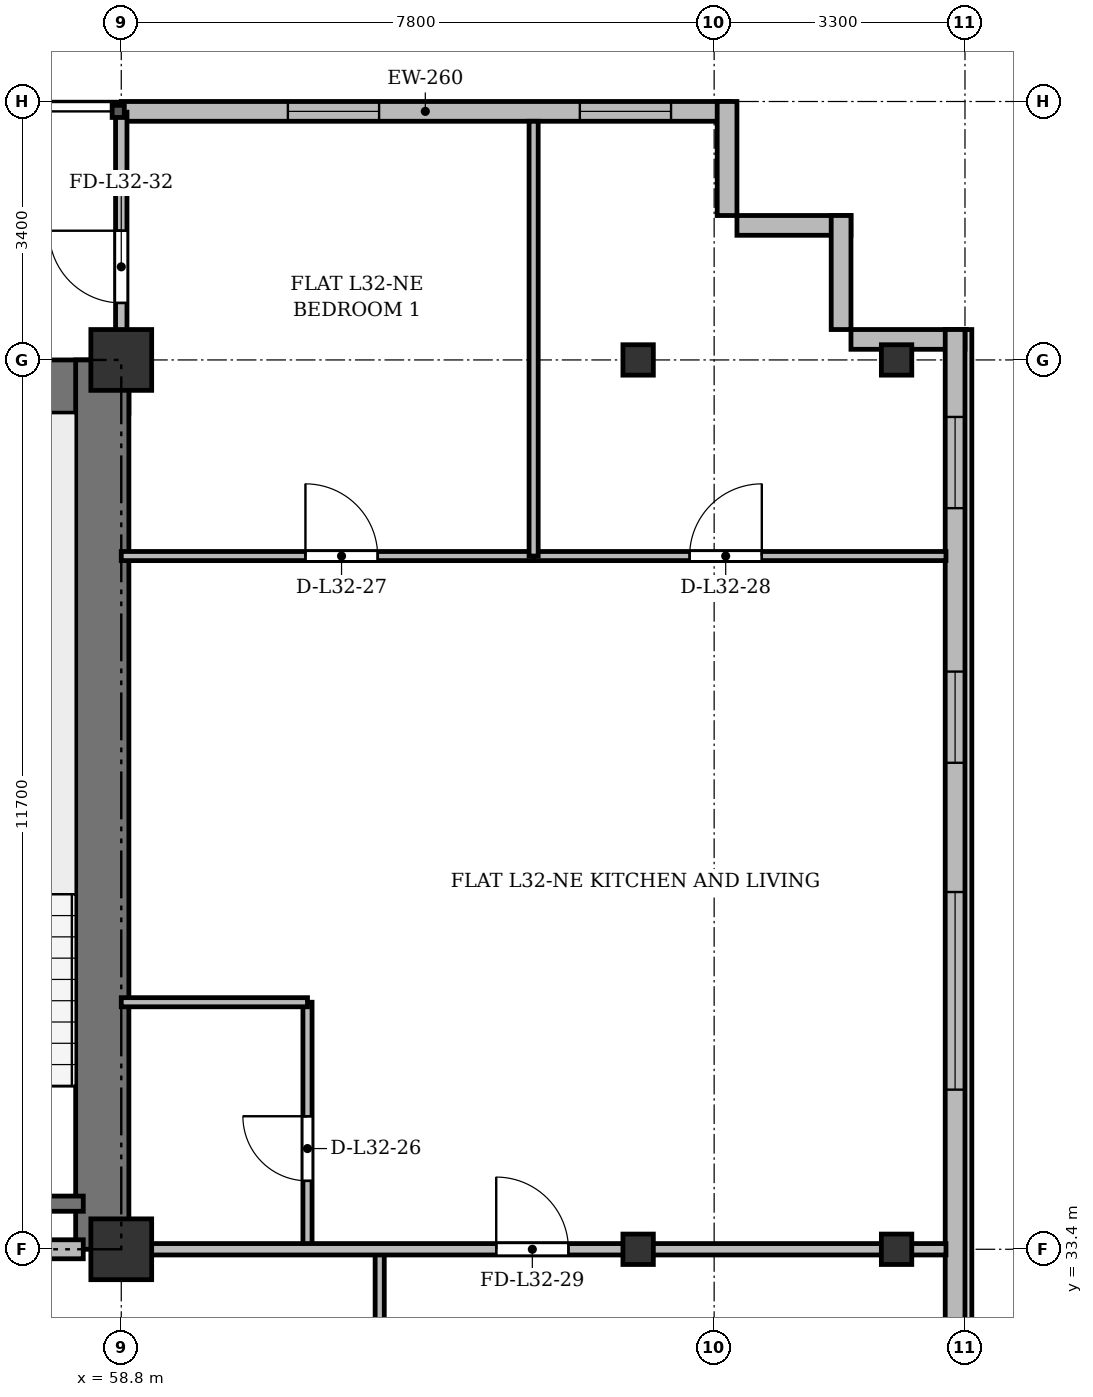
"""IFC4 building model, lengths in metres.
Left out: names, types, materials, properties, quantities, classifications, styles, units other than length and angle.
Written with IfcOpenShell. Run it as: python <this file> out.ifc"""

import sys

from ifc_helpers import new_model, si_unit, direction, frame, frame_2d, origin, origin_2d, place, context, subcontext, project, spatial, rectangle, i_section, extrude, source, transform, mapped, element, fill, save


model = new_model("IFC4")
c1 = context("Model", 3, precision=1e-05, world=origin(), true_north=direction((0.0, 1.0)))
c2 = subcontext(c1, "Body", "Model", "MODEL_VIEW")
j1 = project(units=[si_unit("LENGTHUNIT", "METRE"), si_unit("PLANEANGLEUNIT", "RADIAN")], contexts=[c1])
p1 = place(None, origin())
s1 = spatial("IfcSite", under=j1, at=p1, CompositionType="ELEMENT")
p2 = place(p1, origin())
s2 = spatial("IfcBuilding", under=s1, at=p2, CompositionType="ELEMENT")
p3 = place(p2, frame((0.0, 0.0, 124.9)))
s3 = spatial("IfcBuildingStorey", under=s2, at=p3, CompositionType="ELEMENT", Elevation=124.9)
m1 = source(origin(), c2, "Body", "SweptSolid", [
    extrude(rectangle(XDim=0.8, YDim=0.8, at=origin_2d()), origin(), (0.0, 0.0, 1.0), 3.6),
])
for number, where, z_axis, x_axis in (
    (1, (58.8, 33.4, 0.0), (0.0, 0.0, 1.0), (1.0, 0.0, 0.0)),
    (2, (58.8, 45.1, 0.0), (0.0, 0.0, 1.0), (1.0, 0.0, 0.0)),
):
    element("IfcColumn", number, at=place(p3, frame(where, z_axis=z_axis, x_axis=x_axis)), inside=s3, PredefinedType="COLUMN", context=c2, shape_type="MappedRepresentation", body=[
        mapped(m1, transform((0.0, 0.0, 0.0), x_axis=(1.0, 0.0, 0.0), y_axis=(0.0, 1.0, 0.0), z_axis=(0.0, 0.0, 1.0), scale=1.0)),
    ])
m2 = source(origin(), c2, "Body", "SweptSolid", [
    extrude(i_section(OverallWidth=0.4, OverallDepth=0.4, WebThickness=0.022, FlangeThickness=0.035, at=origin_2d()), origin(), (0.0, 0.0, 1.0), 3.6),
])
for number, where, z_axis, x_axis in (
    (3, (65.6, 33.4, 0.0), (0.0, 0.0, 1.0), (1.0, 0.0, 0.0)),
    (4, (65.6, 45.1, 0.0), (0.0, 0.0, 1.0), (1.0, 0.0, 0.0)),
    (5, (69.0, 33.4, 0.0), (0.0, 0.0, 1.0), (1.0, 0.0, 0.0)),
    (6, (69.0, 45.1, 0.0), (0.0, 0.0, 1.0), (1.0, 0.0, 0.0)),
):
    element("IfcColumn", number, at=place(p3, frame(where, z_axis=z_axis, x_axis=x_axis)), inside=s3, PredefinedType="COLUMN", context=c2, shape_type="MappedRepresentation", body=[
        mapped(m2, transform((0.0, 0.0, 0.0), x_axis=(1.0, 0.0, 0.0), y_axis=(0.0, 1.0, 0.0), z_axis=(0.0, 0.0, 1.0), scale=1.0)),
    ])
p4 = place(p3, frame((58.8, 48.37, 0.0), z_axis=(0.0, 0.0, 1.0), x_axis=(1.0, 0.0, 0.0)))
e7 = element("IfcWall", 7, at=p4, inside=s3, PredefinedType="SOLIDWALL", context=c2, shape_type="SweptSolid", body=[
    extrude(rectangle(XDim=8.0, YDim=0.26, at=frame_2d((4.0, 0.0))), origin(), (0.0, 0.0, 1.0), 3.34),
])
p5 = place(p4, frame((2.192, 0.0, 0.9)))
e8 = element("IfcOpeningElement", 8, at=p5, cuts=e7, PredefinedType="OPENING", context=c2, shape_type="SweptSolid", body=[
    extrude(rectangle(XDim=1.2, YDim=1.65, at=frame_2d((0.6, 0.825))), frame((0.0, 0.14, 0.0), z_axis=(0.0, -1.0, 0.0), x_axis=(1.0, 0.0, 0.0)), (0.0, 0.0, 1.0), 0.28),
])
p6 = place(p4, frame((6.033, 0.0, 0.9)))
e9 = element("IfcOpeningElement", 9, at=p6, cuts=e7, PredefinedType="OPENING", context=c2, shape_type="SweptSolid", body=[
    extrude(rectangle(XDim=1.2, YDim=1.65, at=frame_2d((0.6, 0.825))), frame((0.0, 0.14, 0.0), z_axis=(0.0, -1.0, 0.0), x_axis=(1.0, 0.0, 0.0)), (0.0, 0.0, 1.0), 0.28),
])
for number, where, z_axis, x_axis in (
    (10, (66.77, 48.5, 0.0), (0.0, 0.0, 1.0), (0.0, -1.0, 0.0)),
    (11, (66.9, 46.87, 0.0), (0.0, 0.0, 1.0), (1.0, 0.0, 0.0)),
    (12, (68.27, 47.0, 0.0), (0.0, 0.0, 1.0), (0.0, -1.0, 0.0)),
):
    element("IfcWall", number, at=place(p3, frame(where, z_axis=z_axis, x_axis=x_axis)), inside=s3, PredefinedType="SOLIDWALL", context=c2, shape_type="SweptSolid", body=[
        extrude(rectangle(XDim=1.5, YDim=0.26, at=frame_2d((0.75, 0.0))), origin(), (0.0, 0.0, 1.0), 3.34),
    ])
p7 = place(p3, frame((68.4, 45.37, 0.0), z_axis=(0.0, 0.0, 1.0), x_axis=(1.0, 0.0, 0.0)))
e13 = element("IfcWall", 13, at=p7, inside=s3, PredefinedType="SOLIDWALL", context=c2, shape_type="SweptSolid", body=[
    extrude(rectangle(XDim=1.5, YDim=0.26, at=frame_2d((0.75, 0.0))), origin(), (0.0, 0.0, 1.0), 2.752),
])
p8 = place(p3, frame((69.77, 45.5, 0.0), z_axis=(0.0, 0.0, 1.0), x_axis=(0.0, -1.0, 0.0)))
e14 = element("IfcWall", 14, at=p8, inside=s3, PredefinedType="SOLIDWALL", context=c2, shape_type="SweptSolid", body=[
    extrude(rectangle(XDim=39.6, YDim=0.26, at=frame_2d((19.8, 0.0))), origin(), (0.0, 0.0, 1.0), 3.34),
])
p9 = place(p8, frame((36.95, 0.0, 0.92)))
e15 = element("IfcOpeningElement", 15, at=p9, cuts=e14, PredefinedType="OPENING", context=c2, shape_type="SweptSolid", body=[
    extrude(rectangle(XDim=1.2, YDim=1.65, at=frame_2d((0.6, 0.825))), frame((0.0, 0.14, 0.0), z_axis=(0.0, -1.0, 0.0), x_axis=(1.0, 0.0, 0.0)), (0.0, 0.0, 1.0), 0.28),
])
p10 = place(p8, frame((32.8, 0.0, 0.92)))
e16 = element("IfcOpeningElement", 16, at=p10, cuts=e14, PredefinedType="OPENING", context=c2, shape_type="SweptSolid", body=[
    extrude(rectangle(XDim=2.6, YDim=1.9, at=frame_2d((1.3, 0.95))), frame((0.0, 0.14, 0.0), z_axis=(0.0, -1.0, 0.0), x_axis=(1.0, 0.0, 0.0)), (0.0, 0.0, 1.0), 0.28),
])
p11 = place(p8, frame((28.6, 0.0, 0.92)))
e17 = element("IfcOpeningElement", 17, at=p11, cuts=e14, PredefinedType="OPENING", context=c2, shape_type="SweptSolid", body=[
    extrude(rectangle(XDim=2.6, YDim=1.9, at=frame_2d((1.3, 0.95))), frame((0.0, 0.14, 0.0), z_axis=(0.0, -1.0, 0.0), x_axis=(1.0, 0.0, 0.0)), (0.0, 0.0, 1.0), 0.28),
])
p12 = place(p8, frame((21.4, 0.0, 0.92)))
e18 = element("IfcOpeningElement", 18, at=p12, cuts=e14, PredefinedType="OPENING", context=c2, shape_type="SweptSolid", body=[
    extrude(rectangle(XDim=2.6, YDim=1.9, at=frame_2d((1.3, 0.95))), frame((0.0, 0.14, 0.0), z_axis=(0.0, -1.0, 0.0), x_axis=(1.0, 0.0, 0.0)), (0.0, 0.0, 1.0), 0.28),
])
p13 = place(p8, frame((7.4, 0.0, 0.92)))
e19 = element("IfcOpeningElement", 19, at=p13, cuts=e14, PredefinedType="OPENING", context=c2, shape_type="SweptSolid", body=[
    extrude(rectangle(XDim=2.6, YDim=1.9, at=frame_2d((1.3, 0.95))), frame((0.0, 0.14, 0.0), z_axis=(0.0, -1.0, 0.0), x_axis=(1.0, 0.0, 0.0)), (0.0, 0.0, 1.0), 0.28),
])
p14 = place(p8, frame((4.5, 0.0, 0.92)))
e20 = element("IfcOpeningElement", 20, at=p14, cuts=e14, PredefinedType="OPENING", context=c2, shape_type="SweptSolid", body=[
    extrude(rectangle(XDim=1.2, YDim=1.65, at=frame_2d((0.6, 0.825))), frame((0.0, 0.14, 0.0), z_axis=(0.0, -1.0, 0.0), x_axis=(1.0, 0.0, 0.0)), (0.0, 0.0, 1.0), 0.28),
])
p15 = place(p8, frame((1.15, 0.0, 0.92)))
e21 = element("IfcOpeningElement", 21, at=p15, cuts=e14, PredefinedType="OPENING", context=c2, shape_type="SweptSolid", body=[
    extrude(rectangle(XDim=1.2, YDim=1.65, at=frame_2d((0.6, 0.825))), frame((0.0, 0.14, 0.0), z_axis=(0.0, -1.0, 0.0), x_axis=(1.0, 0.0, 0.0)), (0.0, 0.0, 1.0), 0.28),
])
p16 = place(p3, frame((15.5, 44.75, 0.0), z_axis=(0.0, 0.0, 1.0), x_axis=(1.0, 0.0, 0.0)))
e22 = element("IfcWall", 22, at=p16, inside=s3, PredefinedType="SHEAR", context=c2, shape_type="SweptSolid", body=[
    extrude(rectangle(XDim=43.4, YDim=0.7, at=frame_2d((21.7, 0.0))), origin(), (0.0, 0.0, 1.0), 3.34),
])
p17 = place(p3, frame((58.55, 33.4, 0.0), z_axis=(0.0, 0.0, 1.0), x_axis=(0.0, 1.0, 0.0)))
e23 = element("IfcWall", 23, at=p17, inside=s3, PredefinedType="SHEAR", context=c2, shape_type="SweptSolid", body=[
    extrude(rectangle(XDim=11.7, YDim=0.7, at=frame_2d((5.85, 0.0))), origin(), (0.0, 0.0, 1.0), 3.34),
])
p18 = place(p3, frame((54.9, 34.0, 0.0), z_axis=(0.0, 0.0, 1.0), x_axis=(1.0, 0.0, 0.0)))
e24 = element("IfcWall", 24, at=p18, inside=s3, PredefinedType="SHEAR", context=c2, shape_type="SweptSolid", body=[
    extrude(rectangle(XDim=3.4, YDim=0.2, at=frame_2d((1.7, 0.0))), origin(), (0.0, 0.0, 1.0), 3.34),
])
p19 = place(p3, frame((47.15, 33.4, 0.0), z_axis=(0.0, 0.0, 1.0), x_axis=(1.0, 0.0, 0.0)))
e25 = element("IfcWall", 25, at=p19, inside=s3, PredefinedType="PARTITIONING", context=c2, shape_type="SweptSolid", body=[
    extrude(rectangle(XDim=11.15, YDim=0.25, at=frame_2d((5.575, 0.0))), origin(), (0.0, 0.0, 1.0), 2.752),
])
p20 = place(p19, frame((0.7, 0.0, 0.0)))
e26 = element("IfcOpeningElement", 26, at=p20, cuts=e25, PredefinedType="OPENING", context=c2, shape_type="SweptSolid", body=[
    extrude(rectangle(XDim=0.95, YDim=2.15, at=frame_2d((0.475, 1.075))), frame((0.0, 0.135, 0.0), z_axis=(0.0, -1.0, 0.0), x_axis=(1.0, 0.0, 0.0)), (0.0, 0.0, 1.0), 0.27),
])
p21 = place(p19, frame((6.0, 0.0, 0.0)))
e27 = element("IfcOpeningElement", 27, at=p21, cuts=e25, PredefinedType="OPENING", context=c2, shape_type="SweptSolid", body=[
    extrude(rectangle(XDim=1.2, YDim=2.15, at=frame_2d((0.6, 1.075))), frame((0.0, 0.135, 0.0), z_axis=(0.0, -1.0, 0.0), x_axis=(1.0, 0.0, 0.0)), (0.0, 0.0, 1.0), 0.27),
])
p22 = place(p3, frame((62.2, 29.8, 0.0), z_axis=(0.0, 0.0, 1.0), x_axis=(0.0, 1.0, 0.0)))
e28 = element("IfcWall", 28, at=p22, inside=s3, PredefinedType="PARTITIONING", context=c2, shape_type="SweptSolid", body=[
    extrude(rectangle(XDim=3.6, YDim=0.12, at=frame_2d((1.8, 0.0))), origin(), (0.0, 0.0, 1.0), 2.752),
])
p23 = place(p3, frame((61.25, 33.4, 0.0), z_axis=(0.0, 0.0, 1.0), x_axis=(0.0, 1.0, 0.0)))
e29 = element("IfcWall", 29, at=p23, inside=s3, PredefinedType="PARTITIONING", context=c2, shape_type="SweptSolid", body=[
    extrude(rectangle(XDim=3.25, YDim=0.12, at=frame_2d((1.625, 0.0))), origin(), (0.0, 0.0, 1.0), 2.752),
])
p24 = place(p23, frame((0.9, 0.0, 0.0)))
e30 = element("IfcOpeningElement", 30, at=p24, cuts=e29, PredefinedType="OPENING", context=c2, shape_type="SweptSolid", body=[
    extrude(rectangle(XDim=0.85, YDim=2.1, at=frame_2d((0.425, 1.05))), frame((0.0, 0.07, 0.0), z_axis=(0.0, -1.0, 0.0), x_axis=(1.0, 0.0, 0.0)), (0.0, 0.0, 1.0), 0.14),
])
p25 = place(p3, frame((58.8, 36.65, 0.0), z_axis=(0.0, 0.0, 1.0), x_axis=(1.0, 0.0, 0.0)))
e31 = element("IfcWall", 31, at=p25, inside=s3, PredefinedType="PARTITIONING", context=c2, shape_type="SweptSolid", body=[
    extrude(rectangle(XDim=2.45, YDim=0.12, at=frame_2d((1.225, 0.0))), origin(), (0.0, 0.0, 1.0), 2.84),
])
p26 = place(p3, frame((58.8, 42.52, 0.0), z_axis=(0.0, 0.0, 1.0), x_axis=(1.0, 0.0, 0.0)))
e32 = element("IfcWall", 32, at=p26, inside=s3, PredefinedType="PARTITIONING", context=c2, shape_type="SweptSolid", body=[
    extrude(rectangle(XDim=5.425, YDim=0.12, at=frame_2d((2.712, 0.0))), origin(), (0.0, 0.0, 1.0), 2.84),
])
p27 = place(p26, frame((2.423, 0.0, 0.0)))
e33 = element("IfcOpeningElement", 33, at=p27, cuts=e32, PredefinedType="OPENING", context=c2, shape_type="SweptSolid", body=[
    extrude(rectangle(XDim=0.95, YDim=2.15, at=frame_2d((0.475, 1.075))), frame((0.0, 0.07, 0.0), z_axis=(0.0, -1.0, 0.0), x_axis=(1.0, 0.0, 0.0)), (0.0, 0.0, 1.0), 0.14),
])
p28 = place(p3, frame((64.225, 42.52, 0.0), z_axis=(0.0, 0.0, 1.0), x_axis=(1.0, 0.0, 0.0)))
e34 = element("IfcWall", 34, at=p28, inside=s3, PredefinedType="PARTITIONING", context=c2, shape_type="SweptSolid", body=[
    extrude(rectangle(XDim=5.425, YDim=0.12, at=frame_2d((2.712, 0.0))), origin(), (0.0, 0.0, 1.0), 2.84),
])
p29 = place(p28, frame((2.052, 0.0, 0.0)))
e35 = element("IfcOpeningElement", 35, at=p29, cuts=e34, PredefinedType="OPENING", context=c2, shape_type="SweptSolid", body=[
    extrude(rectangle(XDim=0.95, YDim=2.15, at=frame_2d((0.475, 1.075))), frame((0.0, 0.07, 0.0), z_axis=(0.0, -1.0, 0.0), x_axis=(1.0, 0.0, 0.0)), (0.0, 0.0, 1.0), 0.14),
])
p30 = place(p3, frame((64.225, 42.52, 0.0), z_axis=(0.0, 0.0, 1.0), x_axis=(0.0, 1.0, 0.0)))
e36 = element("IfcWall", 36, at=p30, inside=s3, PredefinedType="PARTITIONING", context=c2, shape_type="SweptSolid", body=[
    extrude(rectangle(XDim=5.72, YDim=0.12, at=frame_2d((2.86, 0.0))), origin(), (0.0, 0.0, 1.0), 2.752),
])
p31 = place(p3, frame((58.8, 33.4, 0.0), z_axis=(0.0, 0.0, 1.0), x_axis=(1.0, 0.0, 0.0)))
e37 = element("IfcWall", 37, at=p31, inside=s3, PredefinedType="PARTITIONING", context=c2, shape_type="SweptSolid", body=[
    extrude(rectangle(XDim=10.85, YDim=0.15, at=frame_2d((5.425, 0.0))), origin(), (0.0, 0.0, 1.0), 2.752),
])
p32 = place(p31, frame((4.933, 0.0, 0.0)))
e38 = element("IfcOpeningElement", 38, at=p32, cuts=e37, PredefinedType="OPENING", context=c2, shape_type="SweptSolid", body=[
    extrude(rectangle(XDim=0.95, YDim=2.15, at=frame_2d((0.475, 1.075))), frame((0.0, 0.085, 0.0), z_axis=(0.0, -1.0, 0.0), x_axis=(1.0, 0.0, 0.0)), (0.0, 0.0, 1.0), 0.17),
])
p33 = place(p3, frame((58.8, 44.75, 0.0), z_axis=(0.0, 0.0, 1.0), x_axis=(0.0, 1.0, 0.0)))
e39 = element("IfcWall", 39, at=p33, inside=s3, PredefinedType="PARTITIONING", context=c2, shape_type="SweptSolid", body=[
    extrude(rectangle(XDim=3.61, YDim=0.15, at=frame_2d((1.805, 0.0))), origin(), (0.0, 0.0, 1.0), 2.84),
])
p34 = place(p33, frame((1.1, 0.0, 0.0)))
e40 = element("IfcOpeningElement", 40, at=p34, cuts=e39, PredefinedType="OPENING", context=c2, shape_type="SweptSolid", body=[
    extrude(rectangle(XDim=0.95, YDim=2.15, at=frame_2d((0.475, 1.075))), frame((0.0, 0.085, 0.0), z_axis=(0.0, -1.0, 0.0), x_axis=(1.0, 0.0, 0.0)), (0.0, 0.0, 1.0), 0.17),
])
m3 = source(origin(), c2, "Body", "SweptSolid", [
    extrude(rectangle(XDim=1.2, YDim=1.65, at=frame_2d((0.6, 0.825))), frame((0.0, 0.03, 0.0), z_axis=(0.0, -1.0, 0.0), x_axis=(1.0, 0.0, 0.0)), (0.0, 0.0, 1.0), 0.06),
])
p35 = place(p5, origin())
e41 = element("IfcWindow", 41, at=p35, inside=s3, PartitioningType="SINGLE_PANEL", PredefinedType="WINDOW", context=c2, shape_type="MappedRepresentation", body=[
    mapped(m3, transform((0.0, 0.0, 0.0), x_axis=(1.0, 0.0, 0.0), y_axis=(0.0, 1.0, 0.0), z_axis=(0.0, 0.0, 1.0), scale=1.0)),
])
fill(e8, e41)
p36 = place(p6, origin())
e42 = element("IfcWindow", 42, at=p36, inside=s3, PartitioningType="SINGLE_PANEL", PredefinedType="WINDOW", context=c2, shape_type="MappedRepresentation", body=[
    mapped(m3, transform((0.0, 0.0, 0.0), x_axis=(1.0, 0.0, 0.0), y_axis=(0.0, 1.0, 0.0), z_axis=(0.0, 0.0, 1.0), scale=1.0)),
])
fill(e9, e42)
m4 = source(origin(), c2, "Body", "SweptSolid", [
    extrude(rectangle(XDim=2.6, YDim=1.9, at=frame_2d((1.3, 0.95))), frame((0.0, 0.03, 0.0), z_axis=(0.0, -1.0, 0.0), x_axis=(1.0, 0.0, 0.0)), (0.0, 0.0, 1.0), 0.06),
])
p37 = place(p13, origin())
e43 = element("IfcWindow", 43, at=p37, inside=s3, PartitioningType="SINGLE_PANEL", PredefinedType="WINDOW", context=c2, shape_type="MappedRepresentation", body=[
    mapped(m4, transform((0.0, 0.0, 0.0), x_axis=(1.0, 0.0, 0.0), y_axis=(0.0, 1.0, 0.0), z_axis=(0.0, 0.0, 1.0), scale=1.0)),
])
fill(e19, e43)
p38 = place(p14, origin())
e44 = element("IfcWindow", 44, at=p38, inside=s3, PartitioningType="SINGLE_PANEL", PredefinedType="WINDOW", context=c2, shape_type="MappedRepresentation", body=[
    mapped(m3, transform((0.0, 0.0, 0.0), x_axis=(1.0, 0.0, 0.0), y_axis=(0.0, 1.0, 0.0), z_axis=(0.0, 0.0, 1.0), scale=1.0)),
])
fill(e20, e44)
p39 = place(p15, origin())
e45 = element("IfcWindow", 45, at=p39, inside=s3, PartitioningType="SINGLE_PANEL", PredefinedType="WINDOW", context=c2, shape_type="MappedRepresentation", body=[
    mapped(m3, transform((0.0, 0.0, 0.0), x_axis=(1.0, 0.0, 0.0), y_axis=(0.0, 1.0, 0.0), z_axis=(0.0, 0.0, 1.0), scale=1.0)),
])
fill(e21, e45)
m5 = source(origin(), c2, "Body", "SweptSolid", [
    extrude(rectangle(XDim=0.85, YDim=2.1, at=frame_2d((0.425, 1.05))), frame((0.0, 0.025, 0.0), z_axis=(0.0, -1.0, 0.0), x_axis=(1.0, 0.0, 0.0)), (0.0, 0.0, 1.0), 0.05),
])
p40 = place(p24, origin())
e46 = element("IfcDoor", 46, at=p40, inside=s3, OperationType="SINGLE_SWING_RIGHT", PredefinedType="DOOR", context=c2, shape_type="MappedRepresentation", body=[
    mapped(m5, transform((0.0, 0.0, 0.0), x_axis=(1.0, 0.0, 0.0), y_axis=(0.0, 1.0, 0.0), z_axis=(0.0, 0.0, 1.0), scale=1.0)),
])
fill(e30, e46)
m6 = source(origin(), c2, "Body", "SweptSolid", [
    extrude(rectangle(XDim=0.95, YDim=2.15, at=frame_2d((0.475, 1.075))), frame((0.0, 0.025, 0.0), z_axis=(0.0, -1.0, 0.0), x_axis=(1.0, 0.0, 0.0)), (0.0, 0.0, 1.0), 0.05),
])
p41 = place(p27, origin())
e47 = element("IfcDoor", 47, at=p41, inside=s3, OperationType="SINGLE_SWING_LEFT", PredefinedType="DOOR", context=c2, shape_type="MappedRepresentation", body=[
    mapped(m6, transform((0.0, 0.0, 0.0), x_axis=(1.0, 0.0, 0.0), y_axis=(0.0, 1.0, 0.0), z_axis=(0.0, 0.0, 1.0), scale=1.0)),
])
fill(e33, e47)
p42 = place(p29, origin())
e48 = element("IfcDoor", 48, at=p42, inside=s3, OperationType="SINGLE_SWING_RIGHT", PredefinedType="DOOR", context=c2, shape_type="MappedRepresentation", body=[
    mapped(m6, transform((0.0, 0.0, 0.0), x_axis=(1.0, 0.0, 0.0), y_axis=(0.0, 1.0, 0.0), z_axis=(0.0, 0.0, 1.0), scale=1.0)),
])
fill(e35, e48)
p43 = place(p32, origin())
e49 = element("IfcDoor", 49, at=p43, inside=s3, OperationType="SINGLE_SWING_LEFT", PredefinedType="DOOR", context=c2, shape_type="MappedRepresentation", body=[
    mapped(m6, transform((0.0, 0.0, 0.0), x_axis=(1.0, 0.0, 0.0), y_axis=(0.0, 1.0, 0.0), z_axis=(0.0, 0.0, 1.0), scale=1.0)),
])
fill(e38, e49)
p44 = place(p34, origin())
e50 = element("IfcDoor", 50, at=p44, inside=s3, OperationType="SINGLE_SWING_RIGHT", PredefinedType="DOOR", context=c2, shape_type="MappedRepresentation", body=[
    mapped(m6, transform((0.0, 0.0, 0.0), x_axis=(1.0, 0.0, 0.0), y_axis=(0.0, 1.0, 0.0), z_axis=(0.0, 0.0, 1.0), scale=1.0)),
])
fill(e40, e50)
save(model, sys.argv[1])
